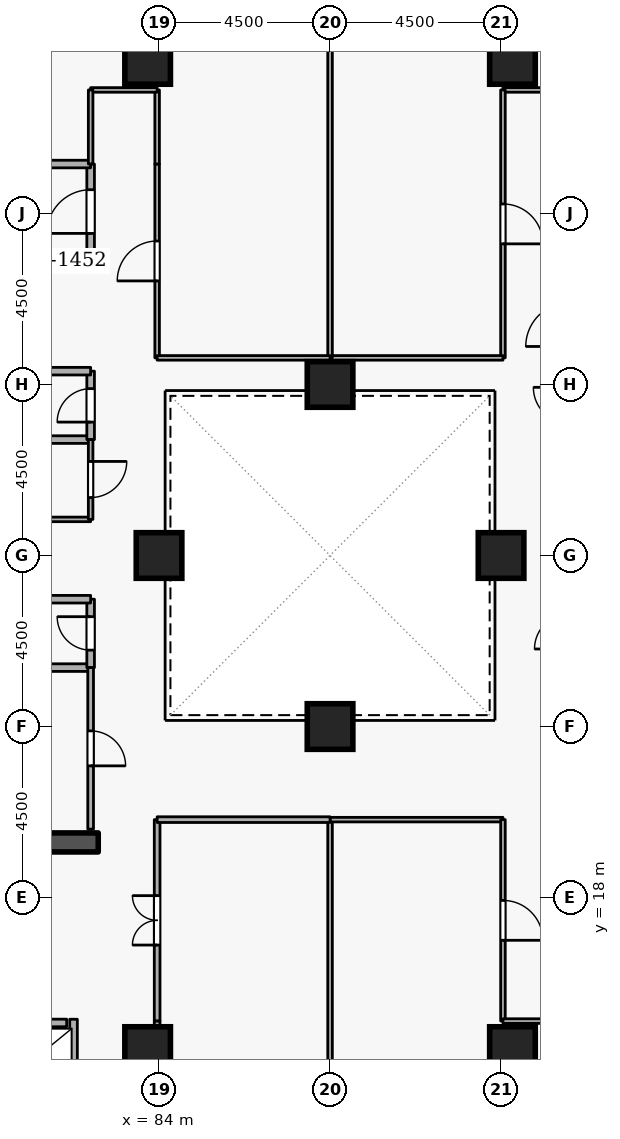
"""IFC4 building model, lengths in metres.
Left out: names, types, materials, properties, quantities, classifications, styles, units other than length and angle.
Written with IfcOpenShell. Run it as: python <this file> out.ifc"""

import sys

from ifc_helpers import new_model, si_unit, direction, frame, frame_2d, origin, origin_2d, place, context, subcontext, project, spatial, rectangle, extrude, element, fill, save


model = new_model("IFC4")
c1 = context("Model", 3, precision=1e-05, world=origin(), true_north=direction((0.0, 1.0)))
c2 = subcontext(c1, "Body", "Model", "MODEL_VIEW")
j1 = project(units=[si_unit("LENGTHUNIT", "METRE"), si_unit("PLANEANGLEUNIT", "RADIAN")], contexts=[c1])
p1 = place(None, origin())
s1 = spatial("IfcSite", under=j1, at=p1, CompositionType="ELEMENT")
p2 = place(p1, origin())
s2 = spatial("IfcBuilding", under=s1, at=p2, CompositionType="ELEMENT")
p3 = place(p2, frame((0.0, 0.0, 119.7)))
s3 = spatial("IfcBuildingStorey", under=s2, at=p3, CompositionType="ELEMENT", Elevation=119.7)
p4 = place(p3, frame((76.6, 19.45, 0.0), z_axis=(0.0, 0.0, 1.0), x_axis=(1.0, 0.0, 0.0)))
e1 = element("IfcWall", 1, at=p4, inside=s3, PredefinedType="SHEAR", context=c2, shape_type="SweptSolid", body=[
    extrude(rectangle(XDim=5.8, YDim=0.5, at=frame_2d((2.9, 0.0))), origin(), (0.0, 0.0, 1.0), 3.6),
])
for number, where, z_axis, x_axis in (
    (2, (93.3, 14.0, 0.0), (0.0, 0.0, 1.0), (1.0, 0.0, 0.0)),
    (3, (93.3, 40.0, 0.0), (0.0, 0.0, 1.0), (1.0, 0.0, 0.0)),
    (4, (83.7, 14.0, 0.0), (0.0, 0.0, 1.0), (1.0, 0.0, 0.0)),
    (5, (83.7, 40.0, 0.0), (0.0, 0.0, 1.0), (1.0, 0.0, 0.0)),
    (6, (93.0, 27.0, 0.0), (0.0, 0.0, 1.0), (1.0, 0.0, 0.0)),
    (7, (84.0, 27.0, 0.0), (0.0, 0.0, 1.0), (1.0, 0.0, 0.0)),
    (8, (88.5, 22.5, 0.0), (0.0, 0.0, 1.0), (1.0, 0.0, 0.0)),
    (9, (88.5, 31.5, 0.0), (0.0, 0.0, 1.0), (1.0, 0.0, 0.0)),
):
    element("IfcColumn", number, at=place(p3, frame(where, z_axis=z_axis, x_axis=x_axis)), inside=s3, PredefinedType="COLUMN", context=c2, shape_type="SweptSolid", body=[
        extrude(rectangle(XDim=1.2, YDim=1.2, at=origin_2d()), origin(), (0.0, 0.0, 1.0), 3.6),
    ])
p5 = place(p3, frame((79.63, 14.7, 0.0), z_axis=(0.0, 0.0, 1.0), x_axis=(1.0, 0.0, 0.0)))
e10 = element("IfcWall", 10, at=p5, inside=s3, PredefinedType="STANDARD", context=c2, shape_type="SweptSolid", body=[
    extrude(rectangle(XDim=1.94, YDim=0.2, at=frame_2d((0.97, 0.0))), origin(), (0.0, 0.0, 1.0), 3.32),
])
p6 = place(p5, frame((0.46, 0.0, 0.0)))
e11 = element("IfcOpeningElement", 11, at=p6, cuts=e10, PredefinedType="OPENING", context=c2, shape_type="SweptSolid", body=[
    extrude(rectangle(XDim=1.02, YDim=2.06, at=frame_2d((0.51, 1.03))), frame((0.0, 0.11, 0.0), z_axis=(0.0, -1.0, 0.0), x_axis=(1.0, 0.0, 0.0)), (0.0, 0.0, 1.0), 0.22),
])
p7 = place(p3, frame((81.75, 12.612, 0.0), z_axis=(0.0, 0.0, 1.0), x_axis=(0.0, 1.0, 0.0)))
e12 = element("IfcWall", 12, at=p7, inside=s3, PredefinedType="STANDARD", context=c2, shape_type="SweptSolid", body=[
    extrude(rectangle(XDim=2.186, YDim=0.2, at=frame_2d((1.093, 0.0))), origin(), (0.0, 0.0, 1.0), 3.32),
])
p8 = place(p3, frame((79.9, 34.8, 0.0), z_axis=(0.0, 0.0, 1.0), x_axis=(1.0, 0.0, 0.0)))
e13 = element("IfcWall", 13, at=p8, inside=s3, PredefinedType="STANDARD", context=c2, shape_type="SweptSolid", body=[
    extrude(rectangle(XDim=2.3, YDim=0.2, at=frame_2d((1.15, 0.0))), origin(), (0.0, 0.0, 1.0), 2.525),
])
p9 = place(p3, frame((82.2, 34.8, 0.0), z_axis=(0.0, 0.0, 1.0), x_axis=(0.0, 1.0, 0.0)))
e14 = element("IfcWall", 14, at=p9, inside=s3, PredefinedType="STANDARD", context=c2, shape_type="SweptSolid", body=[
    extrude(rectangle(XDim=2.5, YDim=0.2, at=frame_2d((1.25, 0.0))), origin(), (0.0, 0.0, 1.0), 3.32),
])
p10 = place(p9, frame((0.675, 0.0, 0.0)))
e15 = element("IfcOpeningElement", 15, at=p10, cuts=e14, PredefinedType="OPENING", context=c2, shape_type="SweptSolid", body=[
    extrude(rectangle(XDim=1.15, YDim=2.1, at=frame_2d((0.575, 1.05))), frame((0.0, 0.11, 0.0), z_axis=(0.0, -1.0, 0.0), x_axis=(1.0, 0.0, 0.0)), (0.0, 0.0, 1.0), 0.22),
])
p11 = place(p3, frame((82.2, 37.3, 0.0), z_axis=(0.0, 0.0, 1.0), x_axis=(-1.0, 0.0, 0.0)))
e16 = element("IfcWall", 16, at=p11, inside=s3, PredefinedType="STANDARD", context=c2, shape_type="SweptSolid", body=[
    extrude(rectangle(XDim=5.7, YDim=0.2, at=frame_2d((2.85, 0.0))), origin(), (0.0, 0.0, 1.0), 3.32),
])
p12 = place(p3, frame((80.15, 24.05, 0.0), z_axis=(0.0, 0.0, 1.0), x_axis=(1.0, 0.0, 0.0)))
e17 = element("IfcWall", 17, at=p12, inside=s3, PredefinedType="STANDARD", context=c2, shape_type="SweptSolid", body=[
    extrude(rectangle(XDim=2.05, YDim=0.2, at=frame_2d((1.025, 0.0))), origin(), (0.0, 0.0, 1.0), 3.32),
])
p13 = place(p3, frame((82.2, 24.05, 0.0), z_axis=(0.0, 0.0, 1.0), x_axis=(0.0, 1.0, 0.0)))
e18 = element("IfcWall", 18, at=p13, inside=s3, PredefinedType="STANDARD", context=c2, shape_type="SweptSolid", body=[
    extrude(rectangle(XDim=1.8, YDim=0.2, at=frame_2d((0.9, 0.0))), origin(), (0.0, 0.0, 1.0), 3.32),
])
p14 = place(p13, frame((0.46, 0.0, 0.0)))
e19 = element("IfcOpeningElement", 19, at=p14, cuts=e18, PredefinedType="OPENING", context=c2, shape_type="SweptSolid", body=[
    extrude(rectangle(XDim=0.88, YDim=2.04, at=frame_2d((0.44, 1.02))), frame((0.0, 0.11, 0.0), z_axis=(0.0, -1.0, 0.0), x_axis=(1.0, 0.0, 0.0)), (0.0, 0.0, 1.0), 0.22),
])
for number, where, z_axis, x_axis in (
    (20, (82.2, 25.85, 0.0), (0.0, 0.0, 1.0), (-1.0, 0.0, 0.0)),
    (21, (80.15, 30.05, 0.0), (0.0, 0.0, 1.0), (1.0, 0.0, 0.0)),
):
    element("IfcWall", number, at=place(p3, frame(where, z_axis=z_axis, x_axis=x_axis)), inside=s3, PredefinedType="STANDARD", context=c2, shape_type="SweptSolid", body=[
        extrude(rectangle(XDim=2.05, YDim=0.2, at=frame_2d((1.025, 0.0))), origin(), (0.0, 0.0, 1.0), 3.32),
    ])
p15 = place(p3, frame((82.2, 30.05, 0.0), z_axis=(0.0, 0.0, 1.0), x_axis=(0.0, 1.0, 0.0)))
e22 = element("IfcWall", 22, at=p15, inside=s3, PredefinedType="STANDARD", context=c2, shape_type="SweptSolid", body=[
    extrude(rectangle(XDim=1.8, YDim=0.2, at=frame_2d((0.9, 0.0))), origin(), (0.0, 0.0, 1.0), 3.32),
])
p16 = place(p15, frame((0.46, 0.0, 0.0)))
e23 = element("IfcOpeningElement", 23, at=p16, cuts=e22, PredefinedType="OPENING", context=c2, shape_type="SweptSolid", body=[
    extrude(rectangle(XDim=0.88, YDim=2.04, at=frame_2d((0.44, 1.02))), frame((0.0, 0.11, 0.0), z_axis=(0.0, -1.0, 0.0), x_axis=(1.0, 0.0, 0.0)), (0.0, 0.0, 1.0), 0.22),
])
p17 = place(p3, frame((82.2, 31.85, 0.0), z_axis=(0.0, 0.0, 1.0), x_axis=(-1.0, 0.0, 0.0)))
e24 = element("IfcWall", 24, at=p17, inside=s3, PredefinedType="STANDARD", context=c2, shape_type="SweptSolid", body=[
    extrude(rectangle(XDim=2.05, YDim=0.2, at=frame_2d((1.025, 0.0))), origin(), (0.0, 0.0, 1.0), 3.32),
])
p18 = place(p3, frame((82.2, 24.05, 0.0), z_axis=(0.0, 0.0, 1.0), x_axis=(0.0, -1.0, 0.0)))
e25 = element("IfcWall", 25, at=p18, inside=s3, PredefinedType="PARTITIONING", context=c2, shape_type="SweptSolid", body=[
    extrude(rectangle(XDim=4.25, YDim=0.15, at=frame_2d((2.125, 0.0))), origin(), (0.0, 0.0, 1.0), 3.32),
])
p19 = place(p18, frame((1.665, 0.0, 0.0)))
e26 = element("IfcOpeningElement", 26, at=p19, cuts=e25, PredefinedType="OPENING", context=c2, shape_type="SweptSolid", body=[
    extrude(rectangle(XDim=0.92, YDim=2.08, at=frame_2d((0.46, 1.04))), frame((0.0, 0.085, 0.0), z_axis=(0.0, -1.0, 0.0), x_axis=(1.0, 0.0, 0.0)), (0.0, 0.0, 1.0), 0.17),
])
p20 = place(p3, frame((82.2, 27.95, 0.0), z_axis=(0.0, 0.0, 1.0), x_axis=(-1.0, 0.0, 0.0)))
e27 = element("IfcWall", 27, at=p20, inside=s3, PredefinedType="PARTITIONING", context=c2, shape_type="SweptSolid", body=[
    extrude(rectangle(XDim=2.05, YDim=0.12, at=frame_2d((1.025, 0.0))), origin(), (0.0, 0.0, 1.0), 3.32),
])
p21 = place(p3, frame((82.2, 30.05, 0.0), z_axis=(0.0, 0.0, 1.0), x_axis=(0.0, -1.0, 0.0)))
e28 = element("IfcWall", 28, at=p21, inside=s3, PredefinedType="PARTITIONING", context=c2, shape_type="SweptSolid", body=[
    extrude(rectangle(XDim=2.1, YDim=0.12, at=frame_2d((1.05, 0.0))), origin(), (0.0, 0.0, 1.0), 3.32),
])
p22 = place(p21, frame((0.575, 0.0, 0.0)))
e29 = element("IfcOpeningElement", 29, at=p22, cuts=e28, PredefinedType="OPENING", context=c2, shape_type="SweptSolid", body=[
    extrude(rectangle(XDim=0.95, YDim=2.1, at=frame_2d((0.475, 1.05))), frame((0.0, 0.07, 0.0), z_axis=(0.0, -1.0, 0.0), x_axis=(1.0, 0.0, 0.0)), (0.0, 0.0, 1.0), 0.14),
])
p23 = place(p3, frame((88.5, 3.28, 0.0), z_axis=(0.0, 0.0, 1.0), x_axis=(0.0, 1.0, 0.0)))
e30 = element("IfcWall", 30, at=p23, inside=s3, PredefinedType="PARTITIONING", context=c2, shape_type="SweptSolid", body=[
    extrude(rectangle(XDim=16.77, YDim=0.12, at=frame_2d((8.385, 0.0))), origin(), (0.0, 0.0, 1.0), 2.912),
])
p24 = place(p3, frame((88.5, 20.05, 0.0), z_axis=(0.0, 0.0, 1.0), x_axis=(1.0, 0.0, 0.0)))
e31 = element("IfcWall", 31, at=p24, inside=s3, PredefinedType="PARTITIONING", context=c2, shape_type="SweptSolid", body=[
    extrude(rectangle(XDim=4.55, YDim=0.12, at=frame_2d((2.275, 0.0))), origin(), (0.0, 0.0, 1.0), 3.32),
])
p25 = place(p3, frame((93.05, 20.05, 0.0), z_axis=(0.0, 0.0, 1.0), x_axis=(0.0, -1.0, 0.0)))
e32 = element("IfcWall", 32, at=p25, inside=s3, PredefinedType="PARTITIONING", context=c2, shape_type="SweptSolid", body=[
    extrude(rectangle(XDim=5.3, YDim=0.12, at=frame_2d((2.65, 0.0))), origin(), (0.0, 0.0, 1.0), 3.32),
])
p26 = place(p25, frame((2.125, 0.0, 0.0)))
e33 = element("IfcOpeningElement", 33, at=p26, cuts=e32, PredefinedType="OPENING", context=c2, shape_type="SweptSolid", body=[
    extrude(rectangle(XDim=1.05, YDim=2.1, at=frame_2d((0.525, 1.05))), frame((0.0, 0.07, 0.0), z_axis=(0.0, -1.0, 0.0), x_axis=(1.0, 0.0, 0.0)), (0.0, 0.0, 1.0), 0.14),
])
p27 = place(p3, frame((93.05, 14.75, 0.0), z_axis=(0.0, 0.0, 1.0), x_axis=(1.0, 0.0, 0.0)))
e34 = element("IfcWall", 34, at=p27, inside=s3, PredefinedType="PARTITIONING", context=c2, shape_type="SweptSolid", body=[
    extrude(rectangle(XDim=1.75, YDim=0.12, at=frame_2d((0.875, 0.0))), origin(), (0.0, 0.0, 1.0), 3.32),
])
p28 = place(p3, frame((83.95, 14.75, 0.0), z_axis=(0.0, 0.0, 1.0), x_axis=(0.0, 1.0, 0.0)))
e35 = element("IfcWall", 35, at=p28, inside=s3, PredefinedType="PARTITIONING", context=c2, shape_type="SweptSolid", body=[
    extrude(rectangle(XDim=5.3, YDim=0.15, at=frame_2d((2.65, 0.0))), origin(), (0.0, 0.0, 1.0), 3.32),
])
p29 = place(p28, frame((2.0, 0.0, 0.0)))
e36 = element("IfcOpeningElement", 36, at=p29, cuts=e35, PredefinedType="OPENING", context=c2, shape_type="SweptSolid", body=[
    extrude(rectangle(XDim=1.3, YDim=2.12, at=frame_2d((0.65, 1.06))), frame((0.0, 0.085, 0.0), z_axis=(0.0, -1.0, 0.0), x_axis=(1.0, 0.0, 0.0)), (0.0, 0.0, 1.0), 0.17),
])
p30 = place(p3, frame((83.95, 20.05, 0.0), z_axis=(0.0, 0.0, 1.0), x_axis=(1.0, 0.0, 0.0)))
e37 = element("IfcWall", 37, at=p30, inside=s3, PredefinedType="PARTITIONING", context=c2, shape_type="SweptSolid", body=[
    extrude(rectangle(XDim=4.55, YDim=0.15, at=frame_2d((2.275, 0.0))), origin(), (0.0, 0.0, 1.0), 3.32),
])
p31 = place(p3, frame((83.95, 12.4, 0.0), z_axis=(0.0, 0.0, 1.0), x_axis=(0.0, 1.0, 0.0)))
e38 = element("IfcWall", 38, at=p31, inside=s3, PredefinedType="PARTITIONING", context=c2, shape_type="SweptSolid", body=[
    extrude(rectangle(XDim=2.35, YDim=0.15, at=frame_2d((1.175, 0.0))), origin(), (0.0, 0.0, 1.0), 3.32),
])
p32 = place(p3, frame((94.8, 39.25, 0.0), z_axis=(0.0, 0.0, 1.0), x_axis=(-1.0, 0.0, 0.0)))
e39 = element("IfcWall", 39, at=p32, inside=s3, PredefinedType="PARTITIONING", context=c2, shape_type="SweptSolid", body=[
    extrude(rectangle(XDim=1.75, YDim=0.12, at=frame_2d((0.875, 0.0))), origin(), (0.0, 0.0, 1.0), 3.32),
])
p33 = place(p3, frame((93.05, 39.25, 0.0), z_axis=(0.0, 0.0, 1.0), x_axis=(0.0, -1.0, 0.0)))
e40 = element("IfcWall", 40, at=p33, inside=s3, PredefinedType="PARTITIONING", context=c2, shape_type="SweptSolid", body=[
    extrude(rectangle(XDim=7.05, YDim=0.12, at=frame_2d((3.525, 0.0))), origin(), (0.0, 0.0, 1.0), 3.32),
])
p34 = place(p33, frame((3.0, 0.0, 0.0)))
e41 = element("IfcOpeningElement", 41, at=p34, cuts=e40, PredefinedType="OPENING", context=c2, shape_type="SweptSolid", body=[
    extrude(rectangle(XDim=1.05, YDim=2.1, at=frame_2d((0.525, 1.05))), frame((0.0, 0.07, 0.0), z_axis=(0.0, -1.0, 0.0), x_axis=(1.0, 0.0, 0.0)), (0.0, 0.0, 1.0), 0.14),
])
p35 = place(p3, frame((93.05, 32.2, 0.0), z_axis=(0.0, 0.0, 1.0), x_axis=(-1.0, 0.0, 0.0)))
e42 = element("IfcWall", 42, at=p35, inside=s3, PredefinedType="PARTITIONING", context=c2, shape_type="SweptSolid", body=[
    extrude(rectangle(XDim=4.55, YDim=0.12, at=frame_2d((2.275, 0.0))), origin(), (0.0, 0.0, 1.0), 3.32),
])
p36 = place(p3, frame((88.5, 32.2, 0.0), z_axis=(0.0, 0.0, 1.0), x_axis=(0.0, 1.0, 0.0)))
e43 = element("IfcWall", 43, at=p36, inside=s3, PredefinedType="PARTITIONING", context=c2, shape_type="SweptSolid", body=[
    extrude(rectangle(XDim=12.52, YDim=0.12, at=frame_2d((6.26, 0.0))), origin(), (0.0, 0.0, 1.0), 2.912),
])
p37 = place(p3, frame((83.95, 32.2, 0.0), z_axis=(0.0, 0.0, 1.0), x_axis=(0.0, 1.0, 0.0)))
e44 = element("IfcWall", 44, at=p37, inside=s3, PredefinedType="PARTITIONING", context=c2, shape_type="SweptSolid", body=[
    extrude(rectangle(XDim=5.1, YDim=0.12, at=frame_2d((2.55, 0.0))), origin(), (0.0, 0.0, 1.0), 3.32),
])
p38 = place(p37, frame((2.025, 0.0, 0.0)))
e45 = element("IfcOpeningElement", 45, at=p38, cuts=e44, PredefinedType="OPENING", context=c2, shape_type="SweptSolid", body=[
    extrude(rectangle(XDim=1.05, YDim=2.1, at=frame_2d((0.525, 1.05))), frame((0.0, 0.07, 0.0), z_axis=(0.0, -1.0, 0.0), x_axis=(1.0, 0.0, 0.0)), (0.0, 0.0, 1.0), 0.14),
])
p39 = place(p3, frame((83.95, 37.3, 0.0), z_axis=(0.0, 0.0, 1.0), x_axis=(0.0, 1.0, 0.0)))
e46 = element("IfcWall", 46, at=p39, inside=s3, PredefinedType="PARTITIONING", context=c2, shape_type="SweptSolid", body=[
    extrude(rectangle(XDim=1.95, YDim=0.12, at=frame_2d((0.975, 0.0))), origin(), (0.0, 0.0, 1.0), 3.32),
])
p40 = place(p3, frame((83.95, 39.25, 0.0), z_axis=(0.0, 0.0, 1.0), x_axis=(-1.0, 0.0, 0.0)))
e47 = element("IfcWall", 47, at=p40, inside=s3, PredefinedType="PARTITIONING", context=c2, shape_type="SweptSolid", body=[
    extrude(rectangle(XDim=1.75, YDim=0.12, at=frame_2d((0.875, 0.0))), origin(), (0.0, 0.0, 1.0), 3.32),
])
p41 = place(p3, frame((82.2, 39.25, 0.0), z_axis=(0.0, 0.0, 1.0), x_axis=(0.0, -1.0, 0.0)))
e48 = element("IfcWall", 48, at=p41, inside=s3, PredefinedType="PARTITIONING", context=c2, shape_type="SweptSolid", body=[
    extrude(rectangle(XDim=1.95, YDim=0.12, at=frame_2d((0.975, 0.0))), origin(), (0.0, 0.0, 1.0), 3.32),
])
p42 = place(p3, frame((88.5, 32.2, 0.0), z_axis=(0.0, 0.0, 1.0), x_axis=(-1.0, 0.0, 0.0)))
e49 = element("IfcWall", 49, at=p42, inside=s3, PredefinedType="PARTITIONING", context=c2, shape_type="SweptSolid", body=[
    extrude(rectangle(XDim=4.55, YDim=0.12, at=frame_2d((2.275, 0.0))), origin(), (0.0, 0.0, 1.0), 3.32),
])
p43 = place(p10, origin())
e50 = element("IfcDoor", 50, at=p43, inside=s3, OperationType="SINGLE_SWING_LEFT", PredefinedType="DOOR", context=c2, shape_type="SweptSolid", body=[
    extrude(rectangle(XDim=1.15, YDim=2.1, at=frame_2d((0.575, 1.05))), frame((0.0, 0.025, 0.0), z_axis=(0.0, -1.0, 0.0), x_axis=(1.0, 0.0, 0.0)), (0.0, 0.0, 1.0), 0.05),
])
fill(e15, e50)
p44 = place(p14, origin())
e51 = element("IfcDoor", 51, at=p44, inside=s3, OperationType="SINGLE_SWING_RIGHT", PredefinedType="DOOR", context=c2, shape_type="SweptSolid", body=[
    extrude(rectangle(XDim=0.88, YDim=2.04, at=frame_2d((0.44, 1.02))), frame((0.0, 0.025, 0.0), z_axis=(0.0, -1.0, 0.0), x_axis=(1.0, 0.0, 0.0)), (0.0, 0.0, 1.0), 0.05),
])
fill(e19, e51)
p45 = place(p16, origin())
e52 = element("IfcDoor", 52, at=p45, inside=s3, OperationType="SINGLE_SWING_LEFT", PredefinedType="DOOR", context=c2, shape_type="SweptSolid", body=[
    extrude(rectangle(XDim=0.88, YDim=2.04, at=frame_2d((0.44, 1.02))), frame((0.0, 0.025, 0.0), z_axis=(0.0, -1.0, 0.0), x_axis=(1.0, 0.0, 0.0)), (0.0, 0.0, 1.0), 0.05),
])
fill(e23, e52)
p46 = place(p19, origin())
e53 = element("IfcDoor", 53, at=p46, inside=s3, OperationType="SINGLE_SWING_RIGHT", PredefinedType="DOOR", context=c2, shape_type="SweptSolid", body=[
    extrude(rectangle(XDim=0.92, YDim=2.08, at=frame_2d((0.46, 1.04))), frame((0.0, 0.025, 0.0), z_axis=(0.0, -1.0, 0.0), x_axis=(1.0, 0.0, 0.0)), (0.0, 0.0, 1.0), 0.05),
])
fill(e26, e53)
p47 = place(p22, origin())
e54 = element("IfcDoor", 54, at=p47, inside=s3, OperationType="SINGLE_SWING_LEFT", PredefinedType="DOOR", context=c2, shape_type="SweptSolid", body=[
    extrude(rectangle(XDim=0.95, YDim=2.1, at=frame_2d((0.475, 1.05))), frame((0.0, 0.025, 0.0), z_axis=(0.0, -1.0, 0.0), x_axis=(1.0, 0.0, 0.0)), (0.0, 0.0, 1.0), 0.05),
])
fill(e29, e54)
p48 = place(p26, origin())
e55 = element("IfcDoor", 55, at=p48, inside=s3, OperationType="SINGLE_SWING_RIGHT", PredefinedType="DOOR", context=c2, shape_type="SweptSolid", body=[
    extrude(rectangle(XDim=1.05, YDim=2.1, at=frame_2d((0.525, 1.05))), frame((0.0, 0.025, 0.0), z_axis=(0.0, -1.0, 0.0), x_axis=(1.0, 0.0, 0.0)), (0.0, 0.0, 1.0), 0.05),
])
fill(e33, e55)
p49 = place(p29, origin())
e56 = element("IfcDoor", 56, at=p49, inside=s3, OperationType="DOUBLE_DOOR_SINGLE_SWING", PredefinedType="DOOR", context=c2, shape_type="SweptSolid", body=[
    extrude(rectangle(XDim=1.3, YDim=2.12, at=frame_2d((0.65, 1.06))), frame((0.0, 0.025, 0.0), z_axis=(0.0, -1.0, 0.0), x_axis=(1.0, 0.0, 0.0)), (0.0, 0.0, 1.0), 0.05),
])
fill(e36, e56)
p50 = place(p34, origin())
e57 = element("IfcDoor", 57, at=p50, inside=s3, OperationType="SINGLE_SWING_RIGHT", PredefinedType="DOOR", context=c2, shape_type="SweptSolid", body=[
    extrude(rectangle(XDim=1.05, YDim=2.1, at=frame_2d((0.525, 1.05))), frame((0.0, 0.025, 0.0), z_axis=(0.0, -1.0, 0.0), x_axis=(1.0, 0.0, 0.0)), (0.0, 0.0, 1.0), 0.05),
])
fill(e41, e57)
p51 = place(p38, origin())
e58 = element("IfcDoor", 58, at=p51, inside=s3, OperationType="SINGLE_SWING_LEFT", PredefinedType="DOOR", context=c2, shape_type="SweptSolid", body=[
    extrude(rectangle(XDim=1.05, YDim=2.1, at=frame_2d((0.525, 1.05))), frame((0.0, 0.025, 0.0), z_axis=(0.0, -1.0, 0.0), x_axis=(1.0, 0.0, 0.0)), (0.0, 0.0, 1.0), 0.05),
])
fill(e45, e58)
save(model, sys.argv[1])
